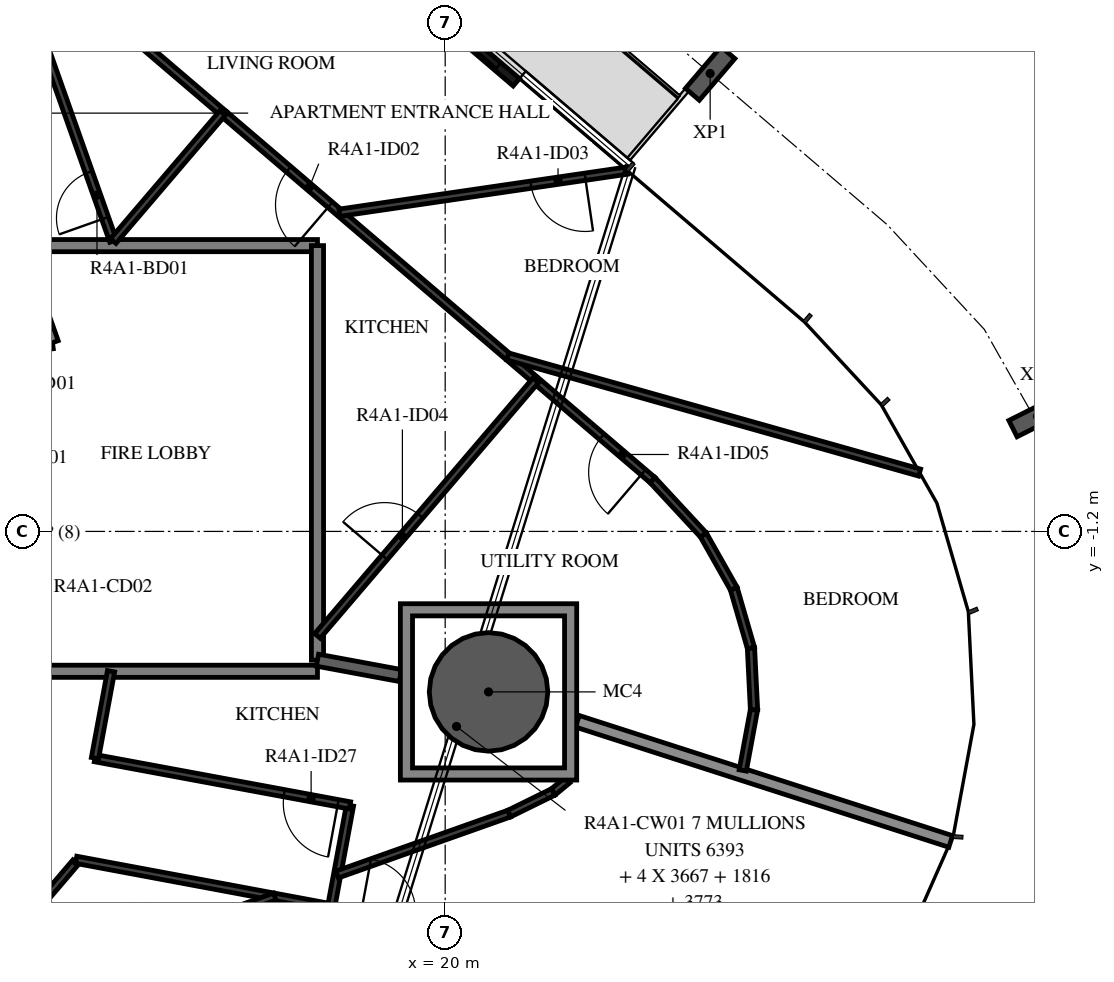
"""IFC4 building model, lengths in metres.
Left out: names, types, materials, properties, quantities, classifications, styles, units other than length and angle.
Written with IfcOpenShell. Run it as: python <this file> out.ifc"""

import sys

from ifc_helpers import new_model, si_unit, direction, frame, frame_2d, origin, origin_2d, place, context, subcontext, project, spatial, polyline, rectangle, hollow_circle, i_section, outline, extrude, element, fill, save


model = new_model("IFC4")
c1 = context("Model", 3, precision=1e-05, world=origin(), true_north=direction((0.0, 1.0)))
c2 = subcontext(c1, "Body", "Model", "MODEL_VIEW")
j1 = project(units=[si_unit("LENGTHUNIT", "METRE"), si_unit("PLANEANGLEUNIT", "RADIAN")], contexts=[c1])
p1 = place(None, origin())
s1 = spatial("IfcSite", under=j1, at=p1, CompositionType="ELEMENT")
p2 = place(p1, origin())
s2 = spatial("IfcBuilding", under=s1, at=p2, CompositionType="ELEMENT")
p3 = place(p2, frame((0.0, 0.0, 155.2)))
s3 = spatial("IfcBuildingStorey", under=s2, at=p3, CompositionType="ELEMENT", Elevation=155.2)
p4 = place(p3, frame((20.713, -3.839, -0.38), z_axis=(0.0, 0.0, 1.0), x_axis=(1.0, 0.0, 0.0)))
e1 = element("IfcColumn", 1, at=p4, inside=s3, PredefinedType="COLUMN", context=c2, shape_type="SweptSolid", body=[
    extrude(hollow_circle(Radius=0.975, WallThickness=0.045, at=origin_2d()), origin(), (0.0, 0.0, 1.0), 3.5),
])
for number, where, z_axis, x_axis in (
    (2, (29.74, 0.692, -0.38), (0.0, 0.0, 1.0), (0.449, -0.894, 0.0)),
    (3, (24.358, 6.331, -0.38), (0.0, 0.0, 1.0), (0.76, -0.649, 0.0)),
):
    element("IfcColumn", number, at=place(p3, frame(where, z_axis=z_axis, x_axis=x_axis)), inside=s3, PredefinedType="COLUMN", context=c2, shape_type="SweptSolid", body=[
        extrude(i_section(OverallWidth=0.3, OverallDepth=0.9, WebThickness=0.019, FlangeThickness=0.035, FilletRadius=0.03, at=origin_2d()), origin(), (0.0, 0.0, 1.0), 3.5),
    ])
p5 = place(p3, frame((21.17, 6.186, 0.0), z_axis=(0.0, 0.0, 1.0), x_axis=(-0.760359548534, 0.649502391799, 0.0)))
e4 = element("IfcWall", 4, at=p5, inside=s3, PredefinedType="STANDARD", context=c2, shape_type="SweptSolid", body=[
    extrude(rectangle(XDim=3.2, YDim=0.16, at=frame_2d((1.6, 0.0))), origin(), (0.0, 0.0, 1.0), 3.12),
])
p6 = place(p5, frame((0.4, 0.0, 0.0)))
e5 = element("IfcOpeningElement", 5, at=p6, cuts=e4, PredefinedType="OPENING", context=c2, shape_type="SweptSolid", body=[
    extrude(rectangle(XDim=2.4, YDim=2.4, at=frame_2d((1.2, 1.2))), frame((0.0, 0.09, 0.0), z_axis=(0.0, -1.0, 0.0), x_axis=(1.0, 0.0, 0.0)), (0.0, 0.0, 1.0), 0.18),
])
p7 = place(p3, frame((11.87, 1.668, 0.0), z_axis=(0.0, 0.0, 1.0), x_axis=(0.990270910415, 0.139152879904, 0.0)))
e6 = element("IfcWall", 6, at=p7, inside=s3, PredefinedType="STANDARD", context=c2, shape_type="SweptSolid", body=[
    extrude(rectangle(XDim=1.688, YDim=0.2, at=frame_2d((0.844, 0.0))), origin(), (0.0, 0.0, 1.0), 3.12),
])
p8 = place(p7, frame((0.11, 0.0, 0.0)))
e7 = element("IfcOpeningElement", 7, at=p8, cuts=e6, PredefinedType="OPENING", context=c2, shape_type="SweptSolid", body=[
    extrude(rectangle(XDim=1.2, YDim=2.1, at=frame_2d((0.6, 1.05))), frame((0.0, 0.11, 0.0), z_axis=(0.0, -1.0, 0.0), x_axis=(1.0, 0.0, 0.0)), (0.0, 0.0, 1.0), 0.22),
])
p9 = place(p3, frame((13.542, 1.903, 0.0), z_axis=(0.0, 0.0, 1.0), x_axis=(-0.333808508206, 0.942640907159, 0.0)))
e8 = element("IfcWall", 8, at=p9, inside=s3, PredefinedType="STANDARD", context=c2, shape_type="SweptSolid", body=[
    extrude(rectangle(XDim=6.317, YDim=0.2, at=frame_2d((3.158, 0.0))), origin(), (0.0, 0.0, 1.0), 3.12),
])
p10 = place(p3, frame((17.9, 3.5, 0.0), z_axis=(0.0, 0.0, 1.0), x_axis=(-1.0, 0.0, 0.0)))
e9 = element("IfcWall", 9, at=p10, inside=s3, PredefinedType="STANDARD", context=c2, shape_type="SweptSolid", body=[
    extrude(rectangle(XDim=4.924, YDim=0.2, at=frame_2d((2.462, 0.0))), origin(), (0.0, 0.0, 1.0), 3.12),
])
p11 = place(p3, frame((17.9, -3.318, 0.0), z_axis=(0.0, 0.0, 1.0), x_axis=(0.0, 1.0, 0.0)))
e10 = element("IfcWall", 10, at=p11, inside=s3, PredefinedType="STANDARD", context=c2, shape_type="SweptSolid", body=[
    extrude(rectangle(XDim=6.818, YDim=0.2, at=frame_2d((3.409, 0.0))), origin(), (0.0, 0.0, 1.0), 3.12),
])
p12 = place(p3, frame((12.979, -3.5, 0.0), z_axis=(0.0, 0.0, 1.0), x_axis=(1.0, 0.0, 0.0)))
e11 = element("IfcWall", 11, at=p12, inside=s3, PredefinedType="STANDARD", context=c2, shape_type="SweptSolid", body=[
    extrude(rectangle(XDim=4.92, YDim=0.2, at=frame_2d((2.46, 0.0))), origin(), (0.0, 0.0, 1.0), 3.12),
])
p13 = place(p3, frame((22.173, -4.322, 0.0), z_axis=(0.0, 0.0, 1.0), x_axis=(0.951906405572, -0.306388960362, 0.0)))
e12 = element("IfcWall", 12, at=p13, inside=s3, PredefinedType="STANDARD", context=c2, shape_type="SweptSolid", body=[
    extrude(rectangle(XDim=6.45, YDim=0.2, at=frame_2d((3.225, 0.0))), origin(), (0.0, 0.0, 1.0), 2.73),
])
p14 = place(p3, frame((17.9, -3.318, 0.0), z_axis=(0.0, 0.0, 1.0), x_axis=(0.983252800712, -0.182246892682, 0.0)))
e13 = element("IfcWall", 13, at=p14, inside=s3, PredefinedType="STANDARD", context=c2, shape_type="SweptSolid", body=[
    extrude(rectangle(XDim=1.386, YDim=0.2, at=frame_2d((0.693, 0.0))), origin(), (0.0, 0.0, 1.0), 3.12),
])
p15 = place(p3, frame((14.541, 3.575, 0.0), z_axis=(0.0, 0.0, 1.0), x_axis=(-0.333799280318, 0.942644174893, 0.0)))
e14 = element("IfcWall", 14, at=p15, inside=s3, PredefinedType="PARTITIONING", context=c2, shape_type="SweptSolid", body=[
    extrude(rectangle(XDim=5.477, YDim=0.12, at=frame_2d((2.738, 0.0))), origin(), (0.0, 0.0, 1.0), 3.12),
])
p16 = place(p15, frame((0.4, 0.0, 0.0)))
e15 = element("IfcOpeningElement", 15, at=p16, cuts=e14, PredefinedType="OPENING", context=c2, shape_type="SweptSolid", body=[
    extrude(rectangle(XDim=0.8, YDim=2.1, at=frame_2d((0.4, 1.05))), frame((0.0, 0.07, 0.0), z_axis=(0.0, -1.0, 0.0), x_axis=(1.0, 0.0, 0.0)), (0.0, 0.0, 1.0), 0.14),
])
p17 = place(p3, frame((12.734, 8.762, 0.0), z_axis=(0.0, 0.0, 1.0), x_axis=(0.760390484255, -0.649466174219, 0.0)))
e16 = element("IfcWall", 16, at=p17, inside=s3, PredefinedType="PARTITIONING", context=c2, shape_type="SweptSolid", body=[
    extrude(rectangle(XDim=4.783, YDim=0.12, at=frame_2d((2.391, 0.0))), origin(), (0.0, 0.0, 1.0), 3.12),
])
p18 = place(p3, frame((23.411, -0.357, 0.0), z_axis=(0.0, 0.0, 1.0), x_axis=(-0.76041871148, 0.649433124525, 0.0)))
e17 = element("IfcWall", 17, at=p18, inside=s3, PredefinedType="PARTITIONING", context=c2, shape_type="SweptSolid", body=[
    extrude(rectangle(XDim=9.259, YDim=0.12, at=frame_2d((4.629, 0.0))), origin(), (0.0, 0.0, 1.0), 3.12),
])
p19 = place(p18, frame((6.972, 0.0, 0.0)))
e18 = element("IfcOpeningElement", 18, at=p19, cuts=e17, PredefinedType="OPENING", context=c2, shape_type="SweptSolid", body=[
    extrude(rectangle(XDim=0.9, YDim=2.1, at=frame_2d((0.45, 1.05))), frame((0.0, 0.07, 0.0), z_axis=(0.0, -1.0, 0.0), x_axis=(1.0, 0.0, 0.0)), (0.0, 0.0, 1.0), 0.14),
])
p20 = place(p18, frame((0.2, 0.0, 0.0)))
e19 = element("IfcOpeningElement", 19, at=p20, cuts=e17, PredefinedType="OPENING", context=c2, shape_type="SweptSolid", body=[
    extrude(rectangle(XDim=0.9, YDim=2.1, at=frame_2d((0.45, 1.05))), frame((0.0, 0.07, 0.0), z_axis=(0.0, -1.0, 0.0), x_axis=(1.0, 0.0, 0.0)), (0.0, 0.0, 1.0), 0.14),
])
p21 = place(p3, frame((16.341, 5.682, 0.0), z_axis=(0.0, 0.0, 1.0), x_axis=(-0.64946993237, -0.76038727432, 0.0)))
e20 = element("IfcWall", 20, at=p21, inside=s3, PredefinedType="PARTITIONING", context=c2, shape_type="SweptSolid", body=[
    extrude(rectangle(XDim=2.771, YDim=0.12, at=frame_2d((1.386, 0.0))), origin(), (0.0, 0.0, 1.0), 3.12),
])
p22 = place(p3, frame((17.9, -2.918, 0.0), z_axis=(0.0, 0.0, 1.0), x_axis=(0.649469887983, 0.760387312232, 0.0)))
e21 = element("IfcWall", 21, at=p22, inside=s3, PredefinedType="PARTITIONING", context=c2, shape_type="SweptSolid", body=[
    extrude(rectangle(XDim=5.527, YDim=0.12, at=frame_2d((2.763, 0.0))), origin(), (0.0, 0.0, 1.0), 3.12),
])
p23 = place(p22, frame((1.7, 0.0, 0.0)))
e22 = element("IfcOpeningElement", 22, at=p23, cuts=e21, PredefinedType="OPENING", context=c2, shape_type="SweptSolid", body=[
    extrude(rectangle(XDim=0.9, YDim=2.1, at=frame_2d((0.45, 1.05))), frame((0.0, 0.07, 0.0), z_axis=(0.0, -1.0, 0.0), x_axis=(1.0, 0.0, 0.0)), (0.0, 0.0, 1.0), 0.14),
])
p24 = place(p3, frame((22.994, 4.734, 0.0), z_axis=(0.0, 0.0, 1.0), x_axis=(-0.989449286977, -0.144879634529, 0.0)))
e23 = element("IfcWall", 23, at=p24, inside=s3, PredefinedType="PARTITIONING", context=c2, shape_type="SweptSolid", body=[
    extrude(rectangle(XDim=4.782, YDim=0.12, at=frame_2d((2.391, 0.0))), origin(), (0.0, 0.0, 1.0), 3.12),
])
p25 = place(p24, frame((0.7, 0.0, 0.0)))
e24 = element("IfcOpeningElement", 24, at=p25, cuts=e23, PredefinedType="OPENING", context=c2, shape_type="SweptSolid", body=[
    extrude(rectangle(XDim=0.9, YDim=2.1, at=frame_2d((0.45, 1.05))), frame((0.0, 0.07, 0.0), z_axis=(0.0, -1.0, 0.0), x_axis=(1.0, 0.0, 0.0)), (0.0, 0.0, 1.0), 0.14),
])
p26 = place(p3, frame((21.029, 1.677, 0.0), z_axis=(0.0, 0.0, 1.0), x_axis=(0.962458274539, -0.271429677396, 0.0)))
e25 = element("IfcWall", 25, at=p26, inside=s3, PredefinedType="PARTITIONING", context=c2, shape_type="SweptSolid", body=[
    extrude(rectangle(XDim=7.037, YDim=0.12, at=frame_2d((3.519, 0.0))), origin(), (0.0, 0.0, 1.0), 3.12),
])
for number, where, z_axis, x_axis in (
    (26, (24.894, -5.131, 0.0), (0.0, 0.0, 1.0), (0.182, 0.983, 0.0)),
    (27, (25.079, -4.132, 0.0), (0.0, 0.0, 1.0), (-0.049, 0.999, 0.0)),
):
    element("IfcWall", number, at=place(p3, frame(where, z_axis=z_axis, x_axis=x_axis)), inside=s3, PredefinedType="PARTITIONING", context=c2, shape_type="SweptSolid", body=[
        extrude(rectangle(XDim=1.016, YDim=0.12, at=frame_2d((0.508, 0.0))), origin(), (0.0, 0.0, 1.0), 3.12),
    ])
for number, where, z_axis, x_axis in (
    (28, (25.029, -3.117, 0.0), (0.0, 0.0, 1.0), (-0.279, 0.96, 0.0)),
    (29, (24.746, -2.141, 0.0), (0.0, 0.0, 1.0), (-0.492, 0.87, 0.0)),
):
    element("IfcWall", number, at=place(p3, frame(where, z_axis=z_axis, x_axis=x_axis)), inside=s3, PredefinedType="PARTITIONING", context=c2, shape_type="SweptSolid", body=[
        extrude(rectangle(XDim=1.016, YDim=0.12, at=frame_2d((0.508, 0.0))), origin(), (0.0, 0.0, 1.0), 3.12),
    ])
p27 = place(p3, frame((24.246, -1.257, 0.0), z_axis=(0.0, 0.0, 1.0), x_axis=(-0.679840361176, 0.733360132074, 0.0)))
e30 = element("IfcWall", 30, at=p27, inside=s3, PredefinedType="PARTITIONING", context=c2, shape_type="SweptSolid", body=[
    extrude(rectangle(XDim=1.227, YDim=0.12, at=frame_2d((0.614, 0.0))), origin(), (0.0, 0.0, 1.0), 3.12),
])
p28 = place(p3, frame((8.737, -12.713, 0.0), z_axis=(0.0, 0.0, 1.0), x_axis=(0.649430604754, 0.760420863476, 0.0)))
e31 = element("IfcWall", 31, at=p28, inside=s3, PredefinedType="PARTITIONING", context=c2, shape_type="SweptSolid", body=[
    extrude(rectangle(XDim=7.985, YDim=0.12, at=frame_2d((3.992, 0.0))), origin(), (0.0, 0.0, 1.0), 3.12),
])
p29 = place(p28, frame((0.2, 0.0, 0.0)))
e32 = element("IfcOpeningElement", 32, at=p29, cuts=e31, PredefinedType="OPENING", context=c2, shape_type="SweptSolid", body=[
    extrude(rectangle(XDim=0.9, YDim=2.1, at=frame_2d((0.45, 1.05))), frame((0.0, 0.07, 0.0), z_axis=(0.0, -1.0, 0.0), x_axis=(1.0, 0.0, 0.0)), (0.0, 0.0, 1.0), 0.14),
])
p30 = place(p28, frame((6.234, 0.0, 0.0)))
e33 = element("IfcOpeningElement", 33, at=p30, cuts=e31, PredefinedType="OPENING", context=c2, shape_type="SweptSolid", body=[
    extrude(rectangle(XDim=0.8, YDim=2.1, at=frame_2d((0.4, 1.05))), frame((0.0, 0.07, 0.0), z_axis=(0.0, -1.0, 0.0), x_axis=(1.0, 0.0, 0.0)), (0.0, 0.0, 1.0), 0.14),
])
p31 = place(p3, frame((13.93, -6.6, 0.0), z_axis=(0.0, 0.0, 1.0), x_axis=(0.983034896283, -0.183418626887, 0.0)))
e34 = element("IfcWall", 34, at=p31, inside=s3, PredefinedType="PARTITIONING", context=c2, shape_type="SweptSolid", body=[
    extrude(rectangle(XDim=13.066, YDim=0.12, at=frame_2d((6.533, 0.0))), origin(), (0.0, 0.0, 1.0), 3.12),
])
p32 = place(p31, frame((4.766, 0.0, 0.0)))
e35 = element("IfcOpeningElement", 35, at=p32, cuts=e34, PredefinedType="OPENING", context=c2, shape_type="SweptSolid", body=[
    extrude(rectangle(XDim=0.9, YDim=2.1, at=frame_2d((0.45, 1.05))), frame((0.0, 0.07, 0.0), z_axis=(0.0, -1.0, 0.0), x_axis=(1.0, 0.0, 0.0)), (0.0, 0.0, 1.0), 0.14),
])
p33 = place(p3, frame((18.125, -7.377, 0.0), z_axis=(0.0, 0.0, 1.0), x_axis=(0.182233242958, 0.983255330604, 0.0)))
e36 = element("IfcWall", 36, at=p33, inside=s3, PredefinedType="PARTITIONING", context=c2, shape_type="SweptSolid", body=[
    extrude(rectangle(XDim=1.7, YDim=0.12, at=frame_2d((0.85, 0.0))), origin(), (0.0, 0.0, 1.0), 3.12),
])
p34 = place(p3, frame((18.435, -5.706, 0.0), z_axis=(0.0, 0.0, 1.0), x_axis=(-0.983256187302, 0.18222862051, 0.0)))
e37 = element("IfcWall", 37, at=p34, inside=s3, PredefinedType="PARTITIONING", context=c2, shape_type="SweptSolid", body=[
    extrude(rectangle(XDim=4.266, YDim=0.12, at=frame_2d((2.133, 0.0))), origin(), (0.0, 0.0, 1.0), 3.12),
])
p35 = place(p34, frame((0.2, 0.0, 0.0)))
e38 = element("IfcOpeningElement", 38, at=p35, cuts=e37, PredefinedType="OPENING", context=c2, shape_type="SweptSolid", body=[
    extrude(rectangle(XDim=0.9, YDim=2.1, at=frame_2d((0.45, 1.05))), frame((0.0, 0.07, 0.0), z_axis=(0.0, -1.0, 0.0), x_axis=(1.0, 0.0, 0.0)), (0.0, 0.0, 1.0), 0.14),
])
p36 = place(p3, frame((14.24, -4.928, 0.0), z_axis=(0.0, 0.0, 1.0), x_axis=(0.182329957282, 0.983237400976, 0.0)))
e39 = element("IfcWall", 39, at=p36, inside=s3, PredefinedType="PARTITIONING", context=c2, shape_type="SweptSolid", body=[
    extrude(rectangle(XDim=1.453, YDim=0.12, at=frame_2d((0.727, 0.0))), origin(), (0.0, 0.0, 1.0), 3.12),
])
p37 = place(p3, frame((17.198, -7.206, 0.0), z_axis=(0.0, 0.0, 1.0), x_axis=(-0.942639551003, -0.333812337826, 0.0)))
e40 = element("IfcWall", 40, at=p37, inside=s3, PredefinedType="PARTITIONING", context=c2, shape_type="SweptSolid", body=[
    extrude(rectangle(XDim=5.713, YDim=0.12, at=frame_2d((2.857, 0.0))), origin(), (0.0, 0.0, 1.0), 3.12),
])
p38 = place(p3, frame((22.013, -5.289, 0.0), z_axis=(0.0, 0.0, 1.0), x_axis=(-0.771907381926, -0.635735002755, 0.0)))
e41 = element("IfcWall", 41, at=p38, inside=s3, PredefinedType="PARTITIONING", context=c2, shape_type="SweptSolid", body=[
    extrude(rectangle(XDim=0.308, YDim=0.12, at=frame_2d((0.154, 0.0))), origin(), (0.0, 0.0, 1.0), 3.12),
])
p39 = place(p3, frame((21.775, -5.485, 0.0), z_axis=(0.0, 0.0, 1.0), x_axis=(-0.897493373385, -0.441027940986, 0.0)))
e42 = element("IfcWall", 42, at=p39, inside=s3, PredefinedType="PARTITIONING", context=c2, shape_type="SweptSolid", body=[
    extrude(rectangle(XDim=0.807, YDim=0.12, at=frame_2d((0.403, 0.0))), origin(), (0.0, 0.0, 1.0), 3.12),
])
p40 = place(p3, frame((21.052, -5.841, 0.0), z_axis=(0.0, 0.0, 1.0), x_axis=(-0.94262615799, -0.33385015542, 0.0)))
e43 = element("IfcWall", 43, at=p40, inside=s3, PredefinedType="PARTITIONING", context=c2, shape_type="SweptSolid", body=[
    extrude(rectangle(XDim=3.0, YDim=0.12, at=frame_2d((1.5, 0.0))), origin(), (0.0, 0.0, 1.0), 3.12),
])
p41 = place(p3, origin())
e44 = element("IfcWall", 44, at=p41, inside=s3, PredefinedType="STANDARD", context=c2, shape_type="SweptSolid", body=[
    extrude(outline(polyline([(22.163, -2.389), (22.163, -5.289), (19.263, -5.289), (19.263, -2.389), (22.163, -2.389)]), holes=[polyline([(19.463, -5.089), (21.963, -5.089), (21.963, -2.589), (19.463, -2.589), (19.463, -5.089)])]), origin(), (0.0, 0.0, 1.0), 3.12),
])
p42 = place(p6, origin())
e45 = element("IfcDoor", 45, at=p42, inside=s3, OperationType="DOUBLE_DOOR_SLIDING", PredefinedType="DOOR", context=c2, shape_type="SweptSolid", body=[
    extrude(rectangle(XDim=2.4, YDim=2.4, at=frame_2d((1.2, 1.2))), frame((0.0, 0.025, 0.0), z_axis=(0.0, -1.0, 0.0), x_axis=(1.0, 0.0, 0.0)), (0.0, 0.0, 1.0), 0.05),
])
fill(e5, e45)
p43 = place(p16, origin())
e46 = element("IfcDoor", 46, at=p43, inside=s3, OperationType="SINGLE_SWING_LEFT", PredefinedType="DOOR", context=c2, shape_type="SweptSolid", body=[
    extrude(rectangle(XDim=0.8, YDim=2.1, at=frame_2d((0.4, 1.05))), frame((0.0, 0.025, 0.0), z_axis=(0.0, -1.0, 0.0), x_axis=(1.0, 0.0, 0.0)), (0.0, 0.0, 1.0), 0.05),
])
fill(e15, e46)
p44 = place(p19, origin())
e47 = element("IfcDoor", 47, at=p44, inside=s3, OperationType="SINGLE_SWING_RIGHT", PredefinedType="DOOR", context=c2, shape_type="SweptSolid", body=[
    extrude(rectangle(XDim=0.9, YDim=2.1, at=frame_2d((0.45, 1.05))), frame((0.0, 0.025, 0.0), z_axis=(0.0, -1.0, 0.0), x_axis=(1.0, 0.0, 0.0)), (0.0, 0.0, 1.0), 0.05),
])
fill(e18, e47)
p45 = place(p25, origin())
e48 = element("IfcDoor", 48, at=p45, inside=s3, OperationType="SINGLE_SWING_LEFT", PredefinedType="DOOR", context=c2, shape_type="SweptSolid", body=[
    extrude(rectangle(XDim=0.9, YDim=2.1, at=frame_2d((0.45, 1.05))), frame((0.0, 0.025, 0.0), z_axis=(0.0, -1.0, 0.0), x_axis=(1.0, 0.0, 0.0)), (0.0, 0.0, 1.0), 0.05),
])
fill(e24, e48)
p46 = place(p23, origin())
e49 = element("IfcDoor", 49, at=p46, inside=s3, OperationType="SINGLE_SWING_LEFT", PredefinedType="DOOR", context=c2, shape_type="SweptSolid", body=[
    extrude(rectangle(XDim=0.9, YDim=2.1, at=frame_2d((0.45, 1.05))), frame((0.0, 0.025, 0.0), z_axis=(0.0, -1.0, 0.0), x_axis=(1.0, 0.0, 0.0)), (0.0, 0.0, 1.0), 0.05),
])
fill(e22, e49)
p47 = place(p20, origin())
e50 = element("IfcDoor", 50, at=p47, inside=s3, OperationType="SINGLE_SWING_LEFT", PredefinedType="DOOR", context=c2, shape_type="SweptSolid", body=[
    extrude(rectangle(XDim=0.9, YDim=2.1, at=frame_2d((0.45, 1.05))), frame((0.0, 0.025, 0.0), z_axis=(0.0, -1.0, 0.0), x_axis=(1.0, 0.0, 0.0)), (0.0, 0.0, 1.0), 0.05),
])
fill(e19, e50)
p48 = place(p35, origin())
e51 = element("IfcDoor", 51, at=p48, inside=s3, OperationType="SINGLE_SWING_LEFT", PredefinedType="DOOR", context=c2, shape_type="SweptSolid", body=[
    extrude(rectangle(XDim=0.9, YDim=2.1, at=frame_2d((0.45, 1.05))), frame((0.0, 0.025, 0.0), z_axis=(0.0, -1.0, 0.0), x_axis=(1.0, 0.0, 0.0)), (0.0, 0.0, 1.0), 0.05),
])
fill(e38, e51)
save(model, sys.argv[1])
